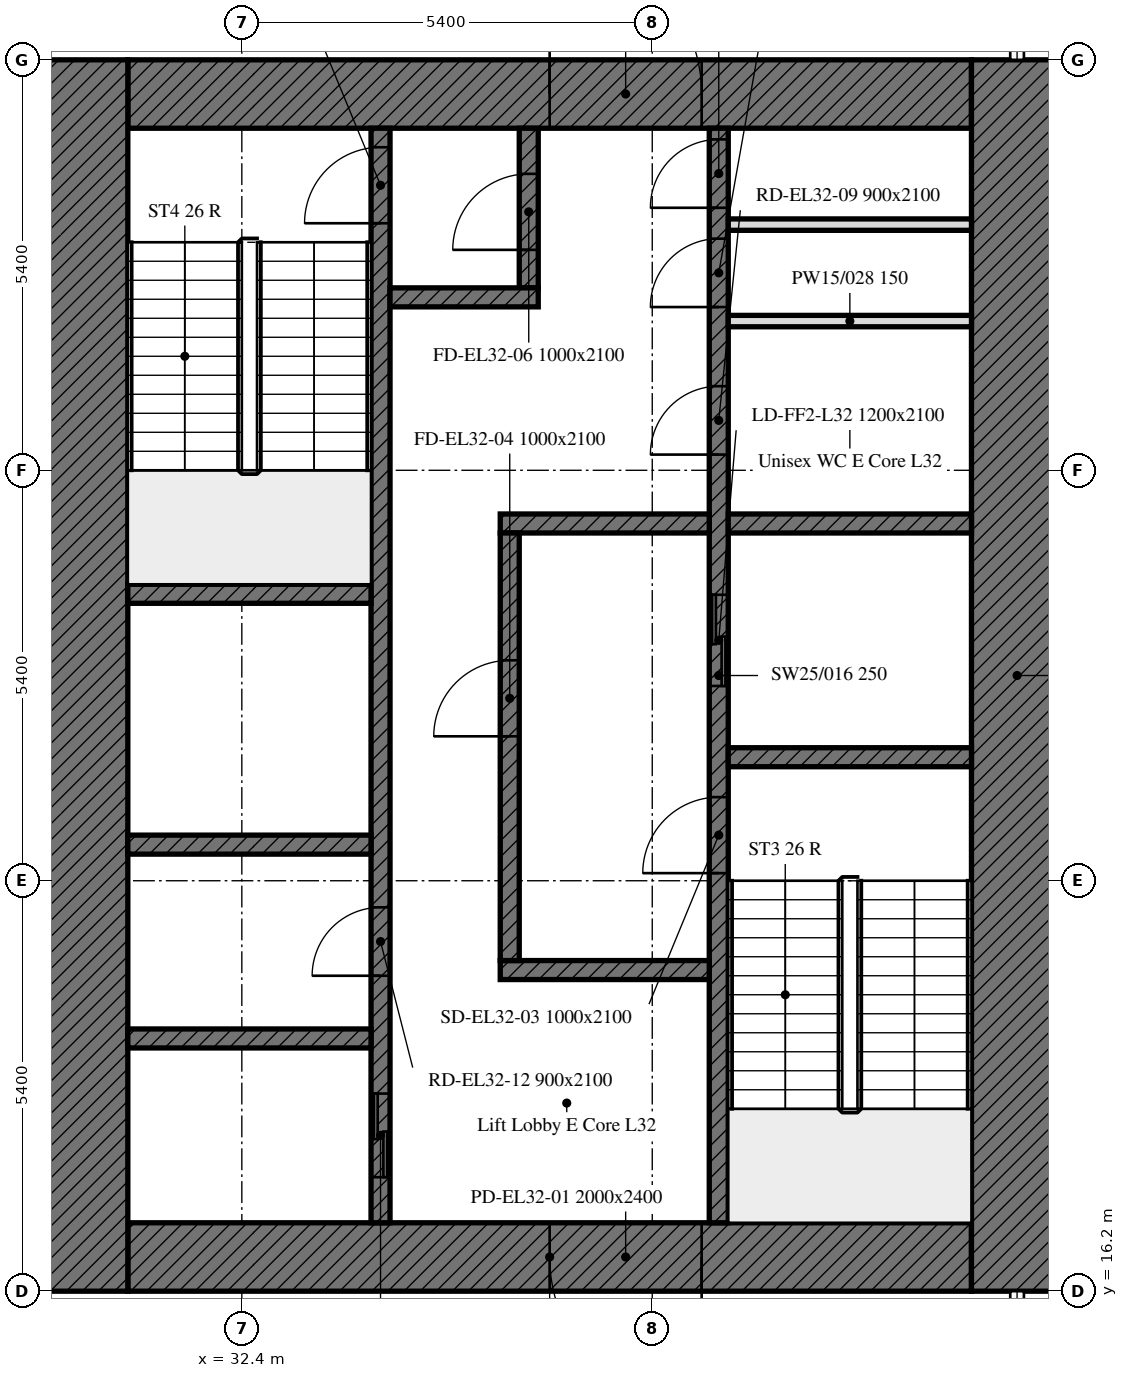
"""IFC4 building model, lengths in metres.
Left out: names, types, materials, properties, quantities, classifications, styles, units other than length and angle.
Written with IfcOpenShell. Run it as: python <this file> out.ifc"""

import sys

from ifc_helpers import new_model, si_unit, direction, frame, frame_2d, origin, place, context, subcontext, project, spatial, rectangle, extrude, element, fill, save


model = new_model("IFC4")
c1 = context("Model", 3, precision=1e-05, world=origin(), true_north=direction((0.0, 1.0)))
c2 = subcontext(c1, "Body", "Model", "MODEL_VIEW")
j1 = project(units=[si_unit("LENGTHUNIT", "METRE"), si_unit("PLANEANGLEUNIT", "RADIAN")], contexts=[c1])
p1 = place(None, origin())
s1 = spatial("IfcSite", under=j1, at=p1, CompositionType="ELEMENT")
p2 = place(p1, origin())
s2 = spatial("IfcBuilding", under=s1, at=p2, CompositionType="ELEMENT")
p3 = place(p2, frame((0.0, 0.0, 138.4)))
s3 = spatial("IfcBuildingStorey", under=s2, at=p3, CompositionType="ELEMENT", Elevation=138.4)
p4 = place(p3, frame((42.0, 16.65, 0.0), z_axis=(0.0, 0.0, 1.0), x_axis=(-1.0, 0.0, 0.0)))
e1 = element("IfcWall", 1, at=p4, inside=s3, PredefinedType="SOLIDWALL", context=c2, shape_type="SweptSolid", body=[
    extrude(rectangle(XDim=11.1, YDim=0.9, at=frame_2d((5.55, 0.0))), origin(), (0.0, 0.0, 1.0), 4.5),
])
p5 = place(p4, frame((3.55, 0.0, 0.0)))
e2 = element("IfcOpeningElement", 2, at=p5, cuts=e1, PredefinedType="OPENING", context=c2, shape_type="SweptSolid", body=[
    extrude(rectangle(XDim=2.0, YDim=2.4, at=frame_2d((1.0, 1.2))), frame((0.0, 0.45, 0.0), z_axis=(0.0, -1.0, 0.0), x_axis=(1.0, 0.0, 0.0)), (0.0, 0.0, 1.0), 0.9),
])
p6 = place(p3, frame((30.9, 31.95, 0.0), z_axis=(0.0, 0.0, 1.0), x_axis=(1.0, 0.0, 0.0)))
e3 = element("IfcWall", 3, at=p6, inside=s3, PredefinedType="SOLIDWALL", context=c2, shape_type="SweptSolid", body=[
    extrude(rectangle(XDim=11.1, YDim=0.9, at=frame_2d((5.55, 0.0))), origin(), (0.0, 0.0, 1.0), 4.5),
])
p7 = place(p6, frame((5.55, 0.0, 0.0)))
e4 = element("IfcOpeningElement", 4, at=p7, cuts=e3, PredefinedType="OPENING", context=c2, shape_type="SweptSolid", body=[
    extrude(rectangle(XDim=2.0, YDim=2.4, at=frame_2d((1.0, 1.2))), frame((0.0, 0.45, 0.0), z_axis=(0.0, -1.0, 0.0), x_axis=(1.0, 0.0, 0.0)), (0.0, 0.0, 1.0), 0.9),
])
for number, where, z_axis, x_axis in (
    (5, (42.6, 32.4, 0.0), (0.0, 0.0, 1.0), (0.0, -1.0, 0.0)),
    (6, (30.3, 16.2, 0.0), (0.0, 0.0, 1.0), (0.0, 1.0, 0.0)),
):
    element("IfcWall", number, at=place(p3, frame(where, z_axis=z_axis, x_axis=x_axis)), inside=s3, PredefinedType="SOLIDWALL", context=c2, shape_type="SweptSolid", body=[
        extrude(rectangle(XDim=16.2, YDim=1.2, at=frame_2d((8.1, 0.0))), origin(), (0.0, 0.0, 1.0), 4.5),
    ])
p8 = place(p3, frame((38.675, 17.1, 0.0), z_axis=(0.0, 0.0, 1.0), x_axis=(0.0, 1.0, 0.0)))
e7 = element("IfcWall", 7, at=p8, inside=s3, PredefinedType="SOLIDWALL", context=c2, shape_type="SweptSolid", body=[
    extrude(rectangle(XDim=14.4, YDim=0.25, at=frame_2d((7.2, 0.0))), origin(), (0.0, 0.0, 1.0), 4.5),
])
p9 = place(p8, frame((4.6, 0.0, 0.0)))
e8 = element("IfcOpeningElement", 8, at=p9, cuts=e7, PredefinedType="OPENING", context=c2, shape_type="SweptSolid", body=[
    extrude(rectangle(XDim=1.0, YDim=2.1, at=frame_2d((0.5, 1.05))), frame((0.0, 0.125, 0.0), z_axis=(0.0, -1.0, 0.0), x_axis=(1.0, 0.0, 0.0)), (0.0, 0.0, 1.0), 0.25),
])
p10 = place(p8, frame((7.062, 0.0, 0.0)))
e9 = element("IfcOpeningElement", 9, at=p10, cuts=e7, PredefinedType="OPENING", context=c2, shape_type="SweptSolid", body=[
    extrude(rectangle(XDim=1.2, YDim=2.1, at=frame_2d((0.6, 1.05))), frame((0.0, 0.125, 0.0), z_axis=(0.0, -1.0, 0.0), x_axis=(1.0, 0.0, 0.0)), (0.0, 0.0, 1.0), 0.25),
])
p11 = place(p8, frame((10.106, 0.0, 0.0)))
e10 = element("IfcOpeningElement", 10, at=p11, cuts=e7, PredefinedType="OPENING", context=c2, shape_type="SweptSolid", body=[
    extrude(rectangle(XDim=0.9, YDim=2.1, at=frame_2d((0.45, 1.05))), frame((0.0, 0.125, 0.0), z_axis=(0.0, -1.0, 0.0), x_axis=(1.0, 0.0, 0.0)), (0.0, 0.0, 1.0), 0.25),
])
p12 = place(p8, frame((12.048, 0.0, 0.0)))
e11 = element("IfcOpeningElement", 11, at=p12, cuts=e7, PredefinedType="OPENING", context=c2, shape_type="SweptSolid", body=[
    extrude(rectangle(XDim=0.9, YDim=2.1, at=frame_2d((0.45, 1.05))), frame((0.0, 0.125, 0.0), z_axis=(0.0, -1.0, 0.0), x_axis=(1.0, 0.0, 0.0)), (0.0, 0.0, 1.0), 0.25),
])
p13 = place(p8, frame((13.354, 0.0, 0.0)))
e12 = element("IfcOpeningElement", 12, at=p13, cuts=e7, PredefinedType="OPENING", context=c2, shape_type="SweptSolid", body=[
    extrude(rectangle(XDim=0.9, YDim=2.1, at=frame_2d((0.45, 1.05))), frame((0.0, 0.125, 0.0), z_axis=(0.0, -1.0, 0.0), x_axis=(1.0, 0.0, 0.0)), (0.0, 0.0, 1.0), 0.25),
])
p14 = place(p3, frame((34.225, 17.1, 0.0), z_axis=(0.0, 0.0, 1.0), x_axis=(0.0, 1.0, 0.0)))
e13 = element("IfcWall", 13, at=p14, inside=s3, PredefinedType="SOLIDWALL", context=c2, shape_type="SweptSolid", body=[
    extrude(rectangle(XDim=14.4, YDim=0.25, at=frame_2d((7.2, 0.0))), origin(), (0.0, 0.0, 1.0), 4.5),
])
p15 = place(p14, frame((13.15, 0.0, 0.0)))
e14 = element("IfcOpeningElement", 14, at=p15, cuts=e13, PredefinedType="OPENING", context=c2, shape_type="SweptSolid", body=[
    extrude(rectangle(XDim=1.0, YDim=2.1, at=frame_2d((0.5, 1.05))), frame((0.0, 0.125, 0.0), z_axis=(0.0, -1.0, 0.0), x_axis=(1.0, 0.0, 0.0)), (0.0, 0.0, 1.0), 0.25),
])
p16 = place(p14, frame((0.6, 0.0, 0.0)))
e15 = element("IfcOpeningElement", 15, at=p16, cuts=e13, PredefinedType="OPENING", context=c2, shape_type="SweptSolid", body=[
    extrude(rectangle(XDim=1.1, YDim=2.1, at=frame_2d((0.55, 1.05))), frame((0.0, 0.125, 0.0), z_axis=(0.0, -1.0, 0.0), x_axis=(1.0, 0.0, 0.0)), (0.0, 0.0, 1.0), 0.25),
])
p17 = place(p14, frame((3.25, 0.0, 0.0)))
e16 = element("IfcOpeningElement", 16, at=p17, cuts=e13, PredefinedType="OPENING", context=c2, shape_type="SweptSolid", body=[
    extrude(rectangle(XDim=0.9, YDim=2.1, at=frame_2d((0.45, 1.05))), frame((0.0, 0.125, 0.0), z_axis=(0.0, -1.0, 0.0), x_axis=(1.0, 0.0, 0.0)), (0.0, 0.0, 1.0), 0.25),
])
p18 = place(p3, frame((38.8, 23.225, 0.0), z_axis=(0.0, 0.0, 1.0), x_axis=(1.0, 0.0, 0.0)))
e17 = element("IfcWall", 17, at=p18, inside=s3, PredefinedType="SOLIDWALL", context=c2, shape_type="SweptSolid", body=[
    extrude(rectangle(XDim=3.2, YDim=0.25, at=frame_2d((1.6, 0.0))), origin(), (0.0, 0.0, 1.0), 4.5),
])
for number, where, z_axis, x_axis in (
    (18, (30.9, 25.375, 0.0), (0.0, 0.0, 1.0), (1.0, 0.0, 0.0)),
    (19, (30.9, 22.075, 0.0), (0.0, 0.0, 1.0), (1.0, 0.0, 0.0)),
):
    element("IfcWall", number, at=place(p3, frame(where, z_axis=z_axis, x_axis=x_axis)), inside=s3, PredefinedType="SOLIDWALL", context=c2, shape_type="SweptSolid", body=[
        extrude(rectangle(XDim=3.2, YDim=0.25, at=frame_2d((1.6, 0.0))), origin(), (0.0, 0.0, 1.0), 4.5),
    ])
p19 = place(p3, frame((38.8, 26.3, 0.0), z_axis=(0.0, 0.0, 1.0), x_axis=(1.0, 0.0, 0.0)))
e20 = element("IfcWall", 20, at=p19, inside=s3, PredefinedType="SOLIDWALL", context=c2, shape_type="SweptSolid", body=[
    extrude(rectangle(XDim=3.2, YDim=0.25, at=frame_2d((1.6, 0.0))), origin(), (0.0, 0.0, 1.0), 4.5),
])
for number, where, z_axis, x_axis in (
    (21, (35.8, 26.3, 0.0), (0.0, 0.0, 1.0), (1.0, 0.0, 0.0)),
    (22, (35.8, 20.425, 0.0), (0.0, 0.0, 1.0), (1.0, 0.0, 0.0)),
):
    element("IfcWall", number, at=place(p3, frame(where, z_axis=z_axis, x_axis=x_axis)), inside=s3, PredefinedType="SOLIDWALL", context=c2, shape_type="SweptSolid", body=[
        extrude(rectangle(XDim=2.75, YDim=0.25, at=frame_2d((1.375, 0.0))), origin(), (0.0, 0.0, 1.0), 4.5),
    ])
p20 = place(p3, frame((36.175, 29.4, 0.0), z_axis=(0.0, 0.0, 1.0), x_axis=(0.0, 1.0, 0.0)))
e23 = element("IfcWall", 23, at=p20, inside=s3, PredefinedType="SOLIDWALL", context=c2, shape_type="SweptSolid", body=[
    extrude(rectangle(XDim=2.1, YDim=0.25, at=frame_2d((1.05, 0.0))), origin(), (0.0, 0.0, 1.0), 4.5),
])
p21 = place(p20, frame((0.5, 0.0, 0.0)))
e24 = element("IfcOpeningElement", 24, at=p21, cuts=e23, PredefinedType="OPENING", context=c2, shape_type="SweptSolid", body=[
    extrude(rectangle(XDim=1.0, YDim=2.1, at=frame_2d((0.5, 1.05))), frame((0.0, 0.125, 0.0), z_axis=(0.0, -1.0, 0.0), x_axis=(1.0, 0.0, 0.0)), (0.0, 0.0, 1.0), 0.25),
])
p22 = place(p3, frame((34.35, 29.275, 0.0), z_axis=(0.0, 0.0, 1.0), x_axis=(1.0, 0.0, 0.0)))
e25 = element("IfcWall", 25, at=p22, inside=s3, PredefinedType="SOLIDWALL", context=c2, shape_type="SweptSolid", body=[
    extrude(rectangle(XDim=1.95, YDim=0.25, at=frame_2d((0.975, 0.0))), origin(), (0.0, 0.0, 1.0), 4.5),
])
p23 = place(p3, frame((35.925, 20.55, 0.0), z_axis=(0.0, 0.0, 1.0), x_axis=(0.0, 1.0, 0.0)))
e26 = element("IfcWall", 26, at=p23, inside=s3, PredefinedType="SOLIDWALL", context=c2, shape_type="SweptSolid", body=[
    extrude(rectangle(XDim=5.625, YDim=0.25, at=frame_2d((2.812, 0.0))), origin(), (0.0, 0.0, 1.0), 4.5),
])
p24 = place(p23, frame((2.95, 0.0, 0.0)))
e27 = element("IfcOpeningElement", 27, at=p24, cuts=e26, PredefinedType="OPENING", context=c2, shape_type="SweptSolid", body=[
    extrude(rectangle(XDim=1.0, YDim=2.1, at=frame_2d((0.5, 1.05))), frame((0.0, 0.125, 0.0), z_axis=(0.0, -1.0, 0.0), x_axis=(1.0, 0.0, 0.0)), (0.0, 0.0, 1.0), 0.25),
])
p25 = place(p3, frame((30.9, 19.525, 0.0), z_axis=(0.0, 0.0, 1.0), x_axis=(1.0, 0.0, 0.0)))
e28 = element("IfcWall", 28, at=p25, inside=s3, PredefinedType="SOLIDWALL", context=c2, shape_type="SweptSolid", body=[
    extrude(rectangle(XDim=3.2, YDim=0.25, at=frame_2d((1.6, 0.0))), origin(), (0.0, 0.0, 1.0), 4.5),
])
for number, where, z_axis, x_axis in (
    (29, (38.8, 28.963, 0.0), (0.0, 0.0, 1.0), (1.0, 0.0, 0.0)),
    (30, (38.8, 30.232, 0.0), (0.0, 0.0, 1.0), (1.0, 0.0, 0.0)),
):
    element("IfcWall", number, at=place(p3, frame(where, z_axis=z_axis, x_axis=x_axis)), inside=s3, PredefinedType="PARTITIONING", context=c2, shape_type="SweptSolid", body=[
        extrude(rectangle(XDim=3.2, YDim=0.15, at=frame_2d((1.6, 0.0))), origin(), (0.0, 0.0, 1.0), 4.5),
    ])
p26 = place(p5, origin())
e31 = element("IfcDoor", 31, at=p26, inside=s3, OperationType="DOUBLE_DOOR_SINGLE_SWING", PredefinedType="DOOR", context=c2, shape_type="SweptSolid", body=[
    extrude(rectangle(XDim=2.0, YDim=2.4, at=frame_2d((1.0, 1.2))), frame((0.0, 0.025, 0.0), z_axis=(0.0, -1.0, 0.0), x_axis=(1.0, 0.0, 0.0)), (0.0, 0.0, 1.0), 0.05),
])
fill(e2, e31)
p27 = place(p7, origin())
e32 = element("IfcDoor", 32, at=p27, inside=s3, OperationType="DOUBLE_DOOR_SINGLE_SWING", PredefinedType="DOOR", context=c2, shape_type="SweptSolid", body=[
    extrude(rectangle(XDim=2.0, YDim=2.4, at=frame_2d((1.0, 1.2))), frame((0.0, 0.025, 0.0), z_axis=(0.0, -1.0, 0.0), x_axis=(1.0, 0.0, 0.0)), (0.0, 0.0, 1.0), 0.05),
])
fill(e4, e32)
p28 = place(p9, origin())
e33 = element("IfcDoor", 33, at=p28, inside=s3, OperationType="SINGLE_SWING_LEFT", PredefinedType="DOOR", context=c2, shape_type="SweptSolid", body=[
    extrude(rectangle(XDim=1.0, YDim=2.1, at=frame_2d((0.5, 1.05))), frame((0.0, 0.025, 0.0), z_axis=(0.0, -1.0, 0.0), x_axis=(1.0, 0.0, 0.0)), (0.0, 0.0, 1.0), 0.05),
])
fill(e8, e33)
p29 = place(p24, origin())
e34 = element("IfcDoor", 34, at=p29, inside=s3, OperationType="SINGLE_SWING_LEFT", PredefinedType="DOOR", context=c2, shape_type="SweptSolid", body=[
    extrude(rectangle(XDim=1.0, YDim=2.1, at=frame_2d((0.5, 1.05))), frame((0.0, 0.025, 0.0), z_axis=(0.0, -1.0, 0.0), x_axis=(1.0, 0.0, 0.0)), (0.0, 0.0, 1.0), 0.05),
])
fill(e27, e34)
p30 = place(p15, origin())
e35 = element("IfcDoor", 35, at=p30, inside=s3, OperationType="SINGLE_SWING_LEFT", PredefinedType="DOOR", context=c2, shape_type="SweptSolid", body=[
    extrude(rectangle(XDim=1.0, YDim=2.1, at=frame_2d((0.5, 1.05))), frame((0.0, 0.025, 0.0), z_axis=(0.0, -1.0, 0.0), x_axis=(1.0, 0.0, 0.0)), (0.0, 0.0, 1.0), 0.05),
])
fill(e14, e35)
p31 = place(p21, origin())
e36 = element("IfcDoor", 36, at=p31, inside=s3, OperationType="SINGLE_SWING_LEFT", PredefinedType="DOOR", context=c2, shape_type="SweptSolid", body=[
    extrude(rectangle(XDim=1.0, YDim=2.1, at=frame_2d((0.5, 1.05))), frame((0.0, 0.025, 0.0), z_axis=(0.0, -1.0, 0.0), x_axis=(1.0, 0.0, 0.0)), (0.0, 0.0, 1.0), 0.05),
])
fill(e24, e36)
p32 = place(p10, origin())
e37 = element("IfcDoor", 37, at=p32, inside=s3, OperationType="DOUBLE_DOOR_SLIDING", PredefinedType="DOOR", context=c2, shape_type="SweptSolid", body=[
    extrude(rectangle(XDim=1.2, YDim=2.1, at=frame_2d((0.6, 1.05))), frame((0.0, 0.025, 0.0), z_axis=(0.0, -1.0, 0.0), x_axis=(1.0, 0.0, 0.0)), (0.0, 0.0, 1.0), 0.05),
])
fill(e9, e37)
p33 = place(p16, origin())
e38 = element("IfcDoor", 38, at=p33, inside=s3, OperationType="DOUBLE_DOOR_SLIDING", PredefinedType="DOOR", context=c2, shape_type="SweptSolid", body=[
    extrude(rectangle(XDim=1.1, YDim=2.1, at=frame_2d((0.55, 1.05))), frame((0.0, 0.025, 0.0), z_axis=(0.0, -1.0, 0.0), x_axis=(1.0, 0.0, 0.0)), (0.0, 0.0, 1.0), 0.05),
])
fill(e15, e38)
p34 = place(p11, origin())
e39 = element("IfcDoor", 39, at=p34, inside=s3, OperationType="SINGLE_SWING_LEFT", PredefinedType="DOOR", context=c2, shape_type="SweptSolid", body=[
    extrude(rectangle(XDim=0.9, YDim=2.1, at=frame_2d((0.45, 1.05))), frame((0.0, 0.025, 0.0), z_axis=(0.0, -1.0, 0.0), x_axis=(1.0, 0.0, 0.0)), (0.0, 0.0, 1.0), 0.05),
])
fill(e10, e39)
p35 = place(p12, origin())
e40 = element("IfcDoor", 40, at=p35, inside=s3, OperationType="SINGLE_SWING_LEFT", PredefinedType="DOOR", context=c2, shape_type="SweptSolid", body=[
    extrude(rectangle(XDim=0.9, YDim=2.1, at=frame_2d((0.45, 1.05))), frame((0.0, 0.025, 0.0), z_axis=(0.0, -1.0, 0.0), x_axis=(1.0, 0.0, 0.0)), (0.0, 0.0, 1.0), 0.05),
])
fill(e11, e40)
p36 = place(p13, origin())
e41 = element("IfcDoor", 41, at=p36, inside=s3, OperationType="SINGLE_SWING_LEFT", PredefinedType="DOOR", context=c2, shape_type="SweptSolid", body=[
    extrude(rectangle(XDim=0.9, YDim=2.1, at=frame_2d((0.45, 1.05))), frame((0.0, 0.025, 0.0), z_axis=(0.0, -1.0, 0.0), x_axis=(1.0, 0.0, 0.0)), (0.0, 0.0, 1.0), 0.05),
])
fill(e12, e41)
p37 = place(p17, origin())
e42 = element("IfcDoor", 42, at=p37, inside=s3, OperationType="SINGLE_SWING_LEFT", PredefinedType="DOOR", context=c2, shape_type="SweptSolid", body=[
    extrude(rectangle(XDim=0.9, YDim=2.1, at=frame_2d((0.45, 1.05))), frame((0.0, 0.025, 0.0), z_axis=(0.0, -1.0, 0.0), x_axis=(1.0, 0.0, 0.0)), (0.0, 0.0, 1.0), 0.05),
])
fill(e16, e42)
save(model, sys.argv[1])
